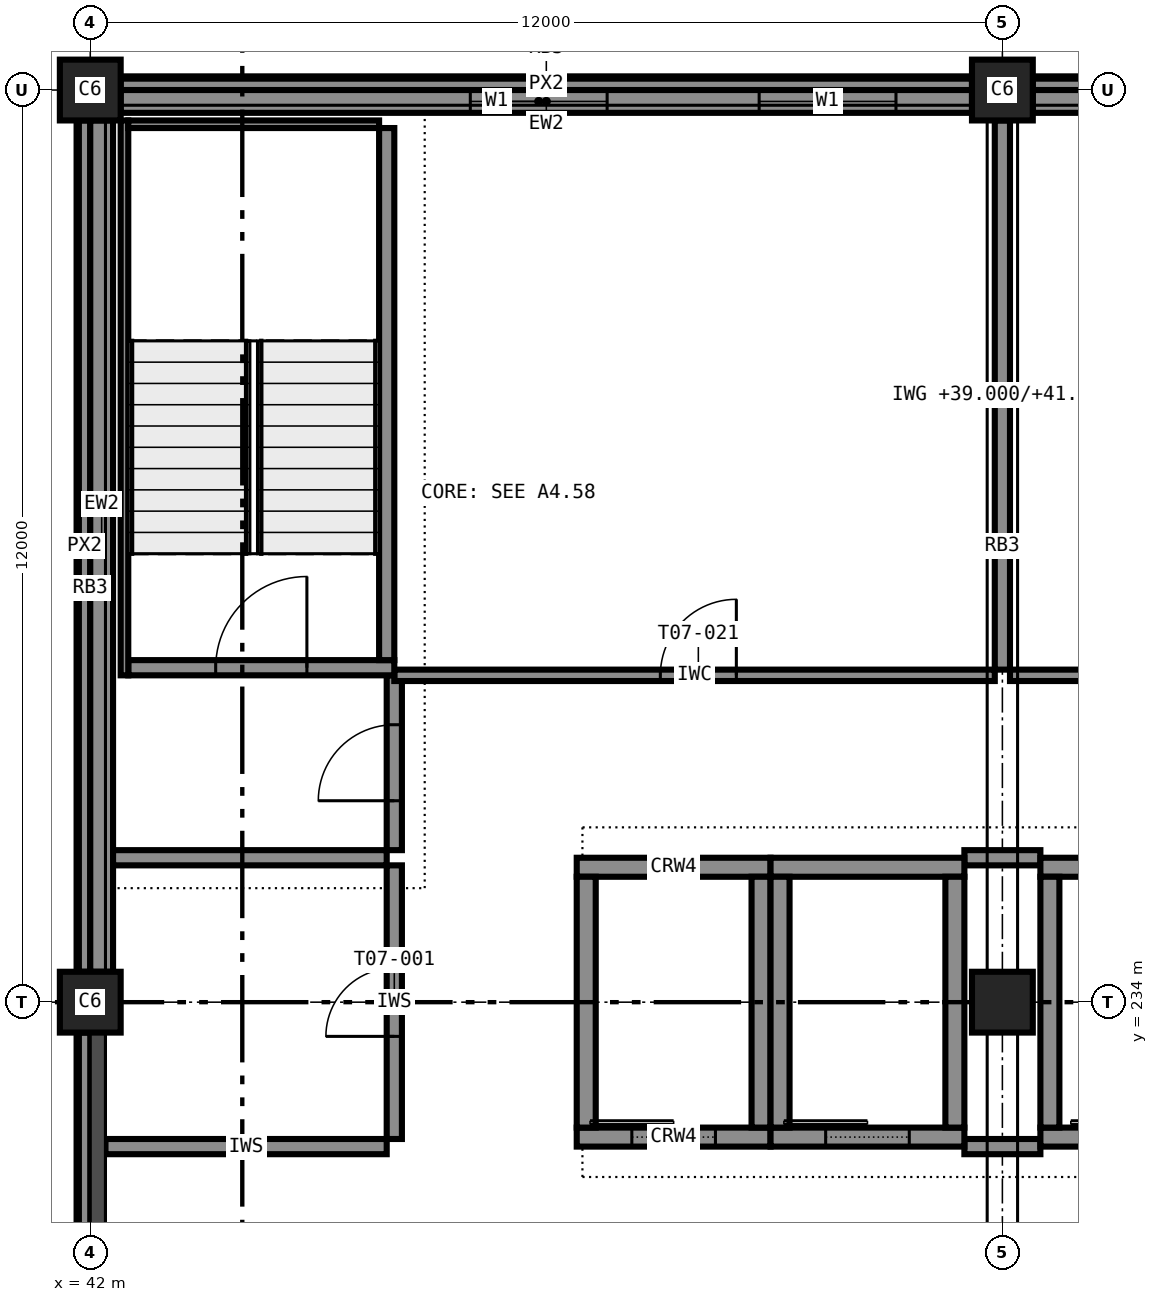
"""IFC4 building model, lengths in metres.
Left out: names, types, materials, properties, quantities, classifications, styles, units other than length and angle.
Written with IfcOpenShell. Run it as: python <this file> out.ifc"""

import sys

from ifc_helpers import new_model, si_unit, direction, frame, frame_2d, origin, origin_2d, place, context, subcontext, project, spatial, rectangle, extrude, element, fill, save


model = new_model("IFC4")
c1 = context("Model", 3, precision=1e-05, world=origin(), true_north=direction((0.0, 1.0)))
c2 = subcontext(c1, "Body", "Model", "MODEL_VIEW")
j1 = project(units=[si_unit("LENGTHUNIT", "METRE"), si_unit("PLANEANGLEUNIT", "RADIAN")], contexts=[c1])
p1 = place(None, origin())
s1 = spatial("IfcSite", under=j1, at=p1, CompositionType="ELEMENT")
p2 = place(p1, origin())
s2 = spatial("IfcBuilding", under=s1, at=p2, CompositionType="ELEMENT")
p3 = place(p2, frame((0.0, 0.0, 39.0)))
s3 = spatial("IfcBuildingStorey", under=s2, at=p3, CompositionType="ELEMENT", Elevation=39.0)
for number, where, z_axis, x_axis in (
    (1, (42.0, 234.0, 0.0), (0.0, 0.0, 1.0), (1.0, 0.0, 0.0)),
    (2, (42.0, 246.0, 0.0), (0.0, 0.0, 1.0), (1.0, 0.0, 0.0)),
    (3, (54.0, 234.0, 0.0), (0.0, 0.0, 1.0), (1.0, 0.0, 0.0)),
    (4, (54.0, 246.0, 0.0), (0.0, 0.0, 1.0), (1.0, 0.0, 0.0)),
):
    element("IfcColumn", number, at=place(p3, frame(where, z_axis=z_axis, x_axis=x_axis)), inside=s3, PredefinedType="COLUMN", context=c2, shape_type="SweptSolid", body=[
        extrude(rectangle(XDim=0.8, YDim=0.8, at=origin_2d()), origin(), (0.0, 0.0, 1.0), 3.6),
    ])
p4 = place(p3, frame((54.5, 232.225, 0.0), z_axis=(0.0, 0.0, 1.0), x_axis=(1.0, 0.0, 0.0)))
e5 = element("IfcWall", 5, at=p4, inside=s3, PredefinedType="SHEAR", context=c2, shape_type="SweptSolid", body=[
    extrude(rectangle(XDim=3.0, YDim=0.25, at=frame_2d((1.5, 0.0))), origin(), (0.0, 0.0, 1.0), 3.6),
])
p5 = place(p4, frame((0.95, 0.0, 0.0)))
e6 = element("IfcOpeningElement", 6, at=p5, cuts=e5, PredefinedType="OPENING", context=c2, shape_type="SweptSolid", body=[
    extrude(rectangle(XDim=1.1, YDim=2.1, at=frame_2d((0.55, 1.05))), frame((0.0, 0.135, 0.0), z_axis=(0.0, -1.0, 0.0), x_axis=(1.0, 0.0, 0.0)), (0.0, 0.0, 1.0), 0.27),
])
p6 = place(p3, frame((54.5, 235.775, 0.0), z_axis=(0.0, 0.0, 1.0), x_axis=(1.0, 0.0, 0.0)))
e7 = element("IfcWall", 7, at=p6, inside=s3, PredefinedType="SHEAR", context=c2, shape_type="SweptSolid", body=[
    extrude(rectangle(XDim=3.0, YDim=0.25, at=frame_2d((1.5, 0.0))), origin(), (0.0, 0.0, 1.0), 3.6),
])
p7 = place(p3, frame((54.625, 232.35, 0.0), z_axis=(0.0, 0.0, 1.0), x_axis=(0.0, 1.0, 0.0)))
e8 = element("IfcWall", 8, at=p7, inside=s3, PredefinedType="SHEAR", context=c2, shape_type="SweptSolid", body=[
    extrude(rectangle(XDim=3.3, YDim=0.25, at=frame_2d((1.65, 0.0))), origin(), (0.0, 0.0, 1.0), 3.6),
])
p8 = place(p3, frame((48.4, 232.225, 0.0), z_axis=(0.0, 0.0, 1.0), x_axis=(1.0, 0.0, 0.0)))
e9 = element("IfcWall", 9, at=p8, inside=s3, PredefinedType="SHEAR", context=c2, shape_type="SweptSolid", body=[
    extrude(rectangle(XDim=2.55, YDim=0.25, at=frame_2d((1.275, 0.0))), origin(), (0.0, 0.0, 1.0), 3.6),
])
p9 = place(p8, frame((0.725, 0.0, 0.0)))
e10 = element("IfcOpeningElement", 10, at=p9, cuts=e9, PredefinedType="OPENING", context=c2, shape_type="SweptSolid", body=[
    extrude(rectangle(XDim=1.1, YDim=2.1, at=frame_2d((0.55, 1.05))), frame((0.0, 0.135, 0.0), z_axis=(0.0, -1.0, 0.0), x_axis=(1.0, 0.0, 0.0)), (0.0, 0.0, 1.0), 0.27),
])
p10 = place(p3, frame((48.4, 235.775, 0.0), z_axis=(0.0, 0.0, 1.0), x_axis=(1.0, 0.0, 0.0)))
e11 = element("IfcWall", 11, at=p10, inside=s3, PredefinedType="SHEAR", context=c2, shape_type="SweptSolid", body=[
    extrude(rectangle(XDim=2.55, YDim=0.25, at=frame_2d((1.275, 0.0))), origin(), (0.0, 0.0, 1.0), 3.6),
])
for number, where, z_axis, x_axis in (
    (12, (48.525, 232.35, 0.0), (0.0, 0.0, 1.0), (0.0, 1.0, 0.0)),
    (13, (50.825, 232.35, 0.0), (0.0, 0.0, 1.0), (0.0, 1.0, 0.0)),
):
    element("IfcWall", number, at=place(p3, frame(where, z_axis=z_axis, x_axis=x_axis)), inside=s3, PredefinedType="SHEAR", context=c2, shape_type="SweptSolid", body=[
        extrude(rectangle(XDim=3.3, YDim=0.25, at=frame_2d((1.65, 0.0))), origin(), (0.0, 0.0, 1.0), 3.6),
    ])
p11 = place(p3, frame((50.95, 232.225, 0.0), z_axis=(0.0, 0.0, 1.0), x_axis=(1.0, 0.0, 0.0)))
e14 = element("IfcWall", 14, at=p11, inside=s3, PredefinedType="SHEAR", context=c2, shape_type="SweptSolid", body=[
    extrude(rectangle(XDim=2.55, YDim=0.25, at=frame_2d((1.275, 0.0))), origin(), (0.0, 0.0, 1.0), 3.6),
])
p12 = place(p11, frame((0.725, 0.0, 0.0)))
e15 = element("IfcOpeningElement", 15, at=p12, cuts=e14, PredefinedType="OPENING", context=c2, shape_type="SweptSolid", body=[
    extrude(rectangle(XDim=1.1, YDim=2.1, at=frame_2d((0.55, 1.05))), frame((0.0, 0.135, 0.0), z_axis=(0.0, -1.0, 0.0), x_axis=(1.0, 0.0, 0.0)), (0.0, 0.0, 1.0), 0.27),
])
p13 = place(p3, frame((50.95, 235.775, 0.0), z_axis=(0.0, 0.0, 1.0), x_axis=(1.0, 0.0, 0.0)))
e16 = element("IfcWall", 16, at=p13, inside=s3, PredefinedType="SHEAR", context=c2, shape_type="SweptSolid", body=[
    extrude(rectangle(XDim=2.55, YDim=0.25, at=frame_2d((1.275, 0.0))), origin(), (0.0, 0.0, 1.0), 3.6),
])
for number, where, z_axis, x_axis in (
    (17, (51.075, 232.35, 0.0), (0.0, 0.0, 1.0), (0.0, 1.0, 0.0)),
    (18, (53.375, 232.35, 0.0), (0.0, 0.0, 1.0), (0.0, 1.0, 0.0)),
):
    element("IfcWall", number, at=place(p3, frame(where, z_axis=z_axis, x_axis=x_axis)), inside=s3, PredefinedType="SHEAR", context=c2, shape_type="SweptSolid", body=[
        extrude(rectangle(XDim=3.3, YDim=0.25, at=frame_2d((1.65, 0.0))), origin(), (0.0, 0.0, 1.0), 3.6),
    ])
p14 = place(p3, frame((42.5, 238.4, 0.0), z_axis=(0.0, 0.0, 1.0), x_axis=(1.0, 0.0, 0.0)))
e19 = element("IfcWall", 19, at=p14, inside=s3, PredefinedType="SHEAR", context=c2, shape_type="SweptSolid", body=[
    extrude(rectangle(XDim=3.5, YDim=0.2, at=frame_2d((1.75, 0.0))), origin(), (0.0, 0.0, 1.0), 3.6),
])
p15 = place(p14, frame((1.15, 0.0, 0.0)))
e20 = element("IfcOpeningElement", 20, at=p15, cuts=e19, PredefinedType="OPENING", context=c2, shape_type="SweptSolid", body=[
    extrude(rectangle(XDim=1.2, YDim=2.1, at=frame_2d((0.6, 1.05))), frame((0.0, 0.11, 0.0), z_axis=(0.0, -1.0, 0.0), x_axis=(1.0, 0.0, 0.0)), (0.0, 0.0, 1.0), 0.22),
])
p16 = place(p3, frame((45.9, 238.5, 0.0), z_axis=(0.0, 0.0, 1.0), x_axis=(0.0, 1.0, 0.0)))
e21 = element("IfcWall", 21, at=p16, inside=s3, PredefinedType="SHEAR", context=c2, shape_type="SweptSolid", body=[
    extrude(rectangle(XDim=7.0, YDim=0.2, at=frame_2d((3.5, 0.0))), origin(), (0.0, 0.0, 1.0), 3.6),
])
p17 = place(p3, frame((42.45, 238.3, 0.0), z_axis=(0.0, 0.0, 1.0), x_axis=(0.0, 1.0, 0.0)))
e22 = element("IfcWall", 22, at=p17, inside=s3, PredefinedType="SHEAR", context=c2, shape_type="SweptSolid", body=[
    extrude(rectangle(XDim=7.3, YDim=0.1, at=frame_2d((3.65, 0.0))), origin(), (0.0, 0.0, 1.0), 3.4),
])
p18 = place(p3, frame((42.5, 245.55, 0.0), z_axis=(0.0, 0.0, 1.0), x_axis=(1.0, 0.0, 0.0)))
e23 = element("IfcWall", 23, at=p18, inside=s3, PredefinedType="SHEAR", context=c2, shape_type="SweptSolid", body=[
    extrude(rectangle(XDim=3.3, YDim=0.1, at=frame_2d((1.65, 0.0))), origin(), (0.0, 0.0, 1.0), 3.4),
])
p19 = place(p3, frame((65.6, 245.85, 0.0), z_axis=(0.0, 0.0, 1.0), x_axis=(-1.0, 0.0, 0.0)))
e24 = element("IfcWall", 24, at=p19, inside=s3, PredefinedType="STANDARD", context=c2, shape_type="SweptSolid", body=[
    extrude(rectangle(XDim=11.2, YDim=0.3, at=frame_2d((5.6, 0.0))), origin(), (0.0, 0.0, 1.0), 2.6),
])
p20 = place(p19, frame((7.5, 0.0, 0.85)))
e25 = element("IfcOpeningElement", 25, at=p20, cuts=e24, PredefinedType="OPENING", context=c2, shape_type="SweptSolid", body=[
    extrude(rectangle(XDim=1.8, YDim=1.75, at=frame_2d((0.9, 0.875))), frame((0.0, 0.16, 0.0), z_axis=(0.0, -1.0, 0.0), x_axis=(1.0, 0.0, 0.0)), (0.0, 0.0, 1.0), 0.32),
])
p21 = place(p19, frame((1.9, 0.0, 0.85)))
e26 = element("IfcOpeningElement", 26, at=p21, cuts=e24, PredefinedType="OPENING", context=c2, shape_type="SweptSolid", body=[
    extrude(rectangle(XDim=1.8, YDim=1.75, at=frame_2d((0.9, 0.875))), frame((0.0, 0.16, 0.0), z_axis=(0.0, -1.0, 0.0), x_axis=(1.0, 0.0, 0.0)), (0.0, 0.0, 1.0), 0.32),
])
p22 = place(p3, frame((53.6, 245.85, 0.0), z_axis=(0.0, 0.0, 1.0), x_axis=(-1.0, 0.0, 0.0)))
e27 = element("IfcWall", 27, at=p22, inside=s3, PredefinedType="STANDARD", context=c2, shape_type="SweptSolid", body=[
    extrude(rectangle(XDim=11.2, YDim=0.3, at=frame_2d((5.6, 0.0))), origin(), (0.0, 0.0, 1.0), 2.6),
])
p23 = place(p22, frame((1.0, 0.0, 0.85)))
e28 = element("IfcOpeningElement", 28, at=p23, cuts=e27, PredefinedType="OPENING", context=c2, shape_type="SweptSolid", body=[
    extrude(rectangle(XDim=1.8, YDim=1.75, at=frame_2d((0.9, 0.875))), frame((0.0, 0.16, 0.0), z_axis=(0.0, -1.0, 0.0), x_axis=(1.0, 0.0, 0.0)), (0.0, 0.0, 1.0), 0.32),
])
p24 = place(p22, frame((4.8, 0.0, 0.85)))
e29 = element("IfcOpeningElement", 29, at=p24, cuts=e27, PredefinedType="OPENING", context=c2, shape_type="SweptSolid", body=[
    extrude(rectangle(XDim=1.8, YDim=1.75, at=frame_2d((0.9, 0.875))), frame((0.0, 0.16, 0.0), z_axis=(0.0, -1.0, 0.0), x_axis=(1.0, 0.0, 0.0)), (0.0, 0.0, 1.0), 0.32),
])
for number, where, z_axis, x_axis in (
    (30, (65.6, 246.075, 3.4), (0.0, 0.0, 1.0), (-1.0, 0.0, 0.0)),
    (31, (53.6, 246.075, 3.4), (0.0, 0.0, 1.0), (-1.0, 0.0, 0.0)),
):
    element("IfcWall", number, at=place(p3, frame(where, z_axis=z_axis, x_axis=x_axis)), inside=s3, PredefinedType="STANDARD", context=c2, shape_type="SweptSolid", body=[
        extrude(rectangle(XDim=11.2, YDim=0.15, at=frame_2d((5.6, 0.0))), origin(), (0.0, 0.0, 1.0), 0.2),
    ])
p25 = place(p3, frame((42.15, 245.6, 0.0), z_axis=(0.0, 0.0, 1.0), x_axis=(0.0, -1.0, 0.0)))
e32 = element("IfcWall", 32, at=p25, inside=s3, PredefinedType="STANDARD", context=c2, shape_type="SweptSolid", body=[
    extrude(rectangle(XDim=11.2, YDim=0.3, at=frame_2d((5.6, 0.0))), origin(), (0.0, 0.0, 1.0), 2.6),
])
for number, where, z_axis, x_axis in (
    (33, (41.925, 245.6, 3.4), (0.0, 0.0, 1.0), (0.0, -1.0, 0.0)),
    (34, (41.925, 233.6, 3.4), (0.0, 0.0, 1.0), (0.0, -1.0, 0.0)),
):
    element("IfcWall", number, at=place(p3, frame(where, z_axis=z_axis, x_axis=x_axis)), inside=s3, PredefinedType="STANDARD", context=c2, shape_type="SweptSolid", body=[
        extrude(rectangle(XDim=11.2, YDim=0.15, at=frame_2d((5.6, 0.0))), origin(), (0.0, 0.0, 1.0), 0.2),
    ])
p26 = place(p3, frame((42.2, 232.1, 0.0), z_axis=(0.0, 0.0, 1.0), x_axis=(1.0, 0.0, 0.0)))
e35 = element("IfcWall", 35, at=p26, inside=s3, PredefinedType="PARTITIONING", context=c2, shape_type="SweptSolid", body=[
    extrude(rectangle(XDim=3.7, YDim=0.2, at=frame_2d((1.85, 0.0))), origin(), (0.0, 0.0, 1.0), 3.4),
])
p27 = place(p3, frame((53.5, 232.1, 0.0), z_axis=(0.0, 0.0, 1.0), x_axis=(1.0, 0.0, 0.0)))
e36 = element("IfcWall", 36, at=p27, inside=s3, PredefinedType="PARTITIONING", context=c2, shape_type="SweptSolid", body=[
    extrude(rectangle(XDim=1.0, YDim=0.2, at=frame_2d((0.5, 0.0))), origin(), (0.0, 0.0, 1.0), 3.4),
])
p28 = place(p3, frame((42.3, 235.9, 0.0), z_axis=(0.0, 0.0, 1.0), x_axis=(1.0, 0.0, 0.0)))
e37 = element("IfcWall", 37, at=p28, inside=s3, PredefinedType="PARTITIONING", context=c2, shape_type="SweptSolid", body=[
    extrude(rectangle(XDim=3.6, YDim=0.2, at=frame_2d((1.8, 0.0))), origin(), (0.0, 0.0, 1.0), 3.4),
])
p29 = place(p3, frame((53.5, 235.9, 0.0), z_axis=(0.0, 0.0, 1.0), x_axis=(1.0, 0.0, 0.0)))
e38 = element("IfcWall", 38, at=p29, inside=s3, PredefinedType="PARTITIONING", context=c2, shape_type="SweptSolid", body=[
    extrude(rectangle(XDim=1.0, YDim=0.2, at=frame_2d((0.5, 0.0))), origin(), (0.0, 0.0, 1.0), 3.4),
])
p30 = place(p3, frame((46.0, 232.2, 0.0), z_axis=(0.0, 0.0, 1.0), x_axis=(0.0, 1.0, 0.0)))
e39 = element("IfcWall", 39, at=p30, inside=s3, PredefinedType="PARTITIONING", context=c2, shape_type="SweptSolid", body=[
    extrude(rectangle(XDim=3.6, YDim=0.2, at=frame_2d((1.8, 0.0))), origin(), (0.0, 0.0, 1.0), 3.4),
])
p31 = place(p30, frame((1.35, 0.0, 0.0)))
e40 = element("IfcOpeningElement", 40, at=p31, cuts=e39, PredefinedType="OPENING", context=c2, shape_type="SweptSolid", body=[
    extrude(rectangle(XDim=0.9, YDim=2.1, at=frame_2d((0.45, 1.05))), frame((0.0, 0.11, 0.0), z_axis=(0.0, -1.0, 0.0), x_axis=(1.0, 0.0, 0.0)), (0.0, 0.0, 1.0), 0.22),
])
p32 = place(p3, frame((46.0, 236.0, 0.0), z_axis=(0.0, 0.0, 1.0), x_axis=(0.0, 1.0, 0.0)))
e41 = element("IfcWall", 41, at=p32, inside=s3, PredefinedType="PARTITIONING", context=c2, shape_type="SweptSolid", body=[
    extrude(rectangle(XDim=2.3, YDim=0.2, at=frame_2d((1.15, 0.0))), origin(), (0.0, 0.0, 1.0), 3.4),
])
p33 = place(p32, frame((0.65, 0.0, 0.0)))
e42 = element("IfcOpeningElement", 42, at=p33, cuts=e41, PredefinedType="OPENING", context=c2, shape_type="SweptSolid", body=[
    extrude(rectangle(XDim=1.0, YDim=2.1, at=frame_2d((0.5, 1.05))), frame((0.0, 0.11, 0.0), z_axis=(0.0, -1.0, 0.0), x_axis=(1.0, 0.0, 0.0)), (0.0, 0.0, 1.0), 0.22),
])
p34 = place(p3, frame((46.0, 238.3, 0.0), z_axis=(0.0, 0.0, 1.0), x_axis=(1.0, 0.0, 0.0)))
e43 = element("IfcWall", 43, at=p34, inside=s3, PredefinedType="PARTITIONING", context=c2, shape_type="SweptSolid", body=[
    extrude(rectangle(XDim=7.9, YDim=0.15, at=frame_2d((3.95, 0.0))), origin(), (0.0, 0.0, 1.0), 3.4),
])
p35 = place(p34, frame((3.5, 0.0, 0.0)))
e44 = element("IfcOpeningElement", 44, at=p35, cuts=e43, PredefinedType="OPENING", context=c2, shape_type="SweptSolid", body=[
    extrude(rectangle(XDim=1.0, YDim=2.1, at=frame_2d((0.5, 1.05))), frame((0.0, 0.085, 0.0), z_axis=(0.0, -1.0, 0.0), x_axis=(1.0, 0.0, 0.0)), (0.0, 0.0, 1.0), 0.17),
])
p36 = place(p3, frame((54.1, 238.3, 0.0), z_axis=(0.0, 0.0, 1.0), x_axis=(1.0, 0.0, 0.0)))
e45 = element("IfcWall", 45, at=p36, inside=s3, PredefinedType="PARTITIONING", context=c2, shape_type="SweptSolid", body=[
    extrude(rectangle(XDim=5.8, YDim=0.15, at=frame_2d((2.9, 0.0))), origin(), (0.0, 0.0, 1.0), 3.4),
])
p37 = place(p36, frame((2.4, 0.0, 0.0)))
e46 = element("IfcOpeningElement", 46, at=p37, cuts=e45, PredefinedType="OPENING", context=c2, shape_type="SweptSolid", body=[
    extrude(rectangle(XDim=1.0, YDim=2.1, at=frame_2d((0.5, 1.05))), frame((0.0, 0.085, 0.0), z_axis=(0.0, -1.0, 0.0), x_axis=(1.0, 0.0, 0.0)), (0.0, 0.0, 1.0), 0.17),
])
p38 = place(p3, frame((54.0, 245.6, 0.0), z_axis=(0.0, 0.0, 1.0), x_axis=(0.0, -1.0, 0.0)))
e47 = element("IfcWall", 47, at=p38, inside=s3, PredefinedType="PARTITIONING", context=c2, shape_type="SweptSolid", body=[
    extrude(rectangle(XDim=7.225, YDim=0.2, at=frame_2d((3.613, 0.0))), origin(), (0.0, 0.0, 1.0), 2.6),
])
p39 = place(p23, origin())
e48 = element("IfcWindow", 48, at=p39, inside=s3, PartitioningType="SINGLE_PANEL", PredefinedType="WINDOW", context=c2, shape_type="SweptSolid", body=[
    extrude(rectangle(XDim=1.8, YDim=1.75, at=frame_2d((0.9, 0.875))), frame((0.0, 0.03, 0.0), z_axis=(0.0, -1.0, 0.0), x_axis=(1.0, 0.0, 0.0)), (0.0, 0.0, 1.0), 0.06),
])
fill(e28, e48)
p40 = place(p24, origin())
e49 = element("IfcWindow", 49, at=p40, inside=s3, PartitioningType="SINGLE_PANEL", PredefinedType="WINDOW", context=c2, shape_type="SweptSolid", body=[
    extrude(rectangle(XDim=1.8, YDim=1.75, at=frame_2d((0.9, 0.875))), frame((0.0, 0.03, 0.0), z_axis=(0.0, -1.0, 0.0), x_axis=(1.0, 0.0, 0.0)), (0.0, 0.0, 1.0), 0.06),
])
fill(e29, e49)
p41 = place(p31, origin())
e50 = element("IfcDoor", 50, at=p41, inside=s3, OperationType="SINGLE_SWING_LEFT", PredefinedType="DOOR", context=c2, shape_type="SweptSolid", body=[
    extrude(rectangle(XDim=0.9, YDim=2.1, at=frame_2d((0.45, 1.05))), frame((0.0, 0.025, 0.0), z_axis=(0.0, -1.0, 0.0), x_axis=(1.0, 0.0, 0.0)), (0.0, 0.0, 1.0), 0.05),
])
fill(e40, e50)
p42 = place(p33, origin())
e51 = element("IfcDoor", 51, at=p42, inside=s3, OperationType="SINGLE_SWING_LEFT", PredefinedType="DOOR", context=c2, shape_type="SweptSolid", body=[
    extrude(rectangle(XDim=1.0, YDim=2.1, at=frame_2d((0.5, 1.05))), frame((0.0, 0.025, 0.0), z_axis=(0.0, -1.0, 0.0), x_axis=(1.0, 0.0, 0.0)), (0.0, 0.0, 1.0), 0.05),
])
fill(e42, e51)
p43 = place(p35, origin())
e52 = element("IfcDoor", 52, at=p43, inside=s3, OperationType="SINGLE_SWING_RIGHT", PredefinedType="DOOR", context=c2, shape_type="SweptSolid", body=[
    extrude(rectangle(XDim=1.0, YDim=2.1, at=frame_2d((0.5, 1.05))), frame((0.0, 0.025, 0.0), z_axis=(0.0, -1.0, 0.0), x_axis=(1.0, 0.0, 0.0)), (0.0, 0.0, 1.0), 0.05),
])
fill(e44, e52)
p44 = place(p9, origin())
e53 = element("IfcDoor", 53, at=p44, inside=s3, OperationType="SLIDING_TO_LEFT", PredefinedType="DOOR", context=c2, shape_type="SweptSolid", body=[
    extrude(rectangle(XDim=1.1, YDim=2.1, at=frame_2d((0.55, 1.05))), frame((0.0, 0.025, 0.0), z_axis=(0.0, -1.0, 0.0), x_axis=(1.0, 0.0, 0.0)), (0.0, 0.0, 1.0), 0.05),
])
fill(e10, e53)
p45 = place(p12, origin())
e54 = element("IfcDoor", 54, at=p45, inside=s3, OperationType="SLIDING_TO_LEFT", PredefinedType="DOOR", context=c2, shape_type="SweptSolid", body=[
    extrude(rectangle(XDim=1.1, YDim=2.1, at=frame_2d((0.55, 1.05))), frame((0.0, 0.025, 0.0), z_axis=(0.0, -1.0, 0.0), x_axis=(1.0, 0.0, 0.0)), (0.0, 0.0, 1.0), 0.05),
])
fill(e15, e54)
p46 = place(p15, origin())
e55 = element("IfcDoor", 55, at=p46, inside=s3, OperationType="SINGLE_SWING_RIGHT", PredefinedType="DOOR", context=c2, shape_type="SweptSolid", body=[
    extrude(rectangle(XDim=1.2, YDim=2.1, at=frame_2d((0.6, 1.05))), frame((0.0, 0.025, 0.0), z_axis=(0.0, -1.0, 0.0), x_axis=(1.0, 0.0, 0.0)), (0.0, 0.0, 1.0), 0.05),
])
fill(e20, e55)
save(model, sys.argv[1])
